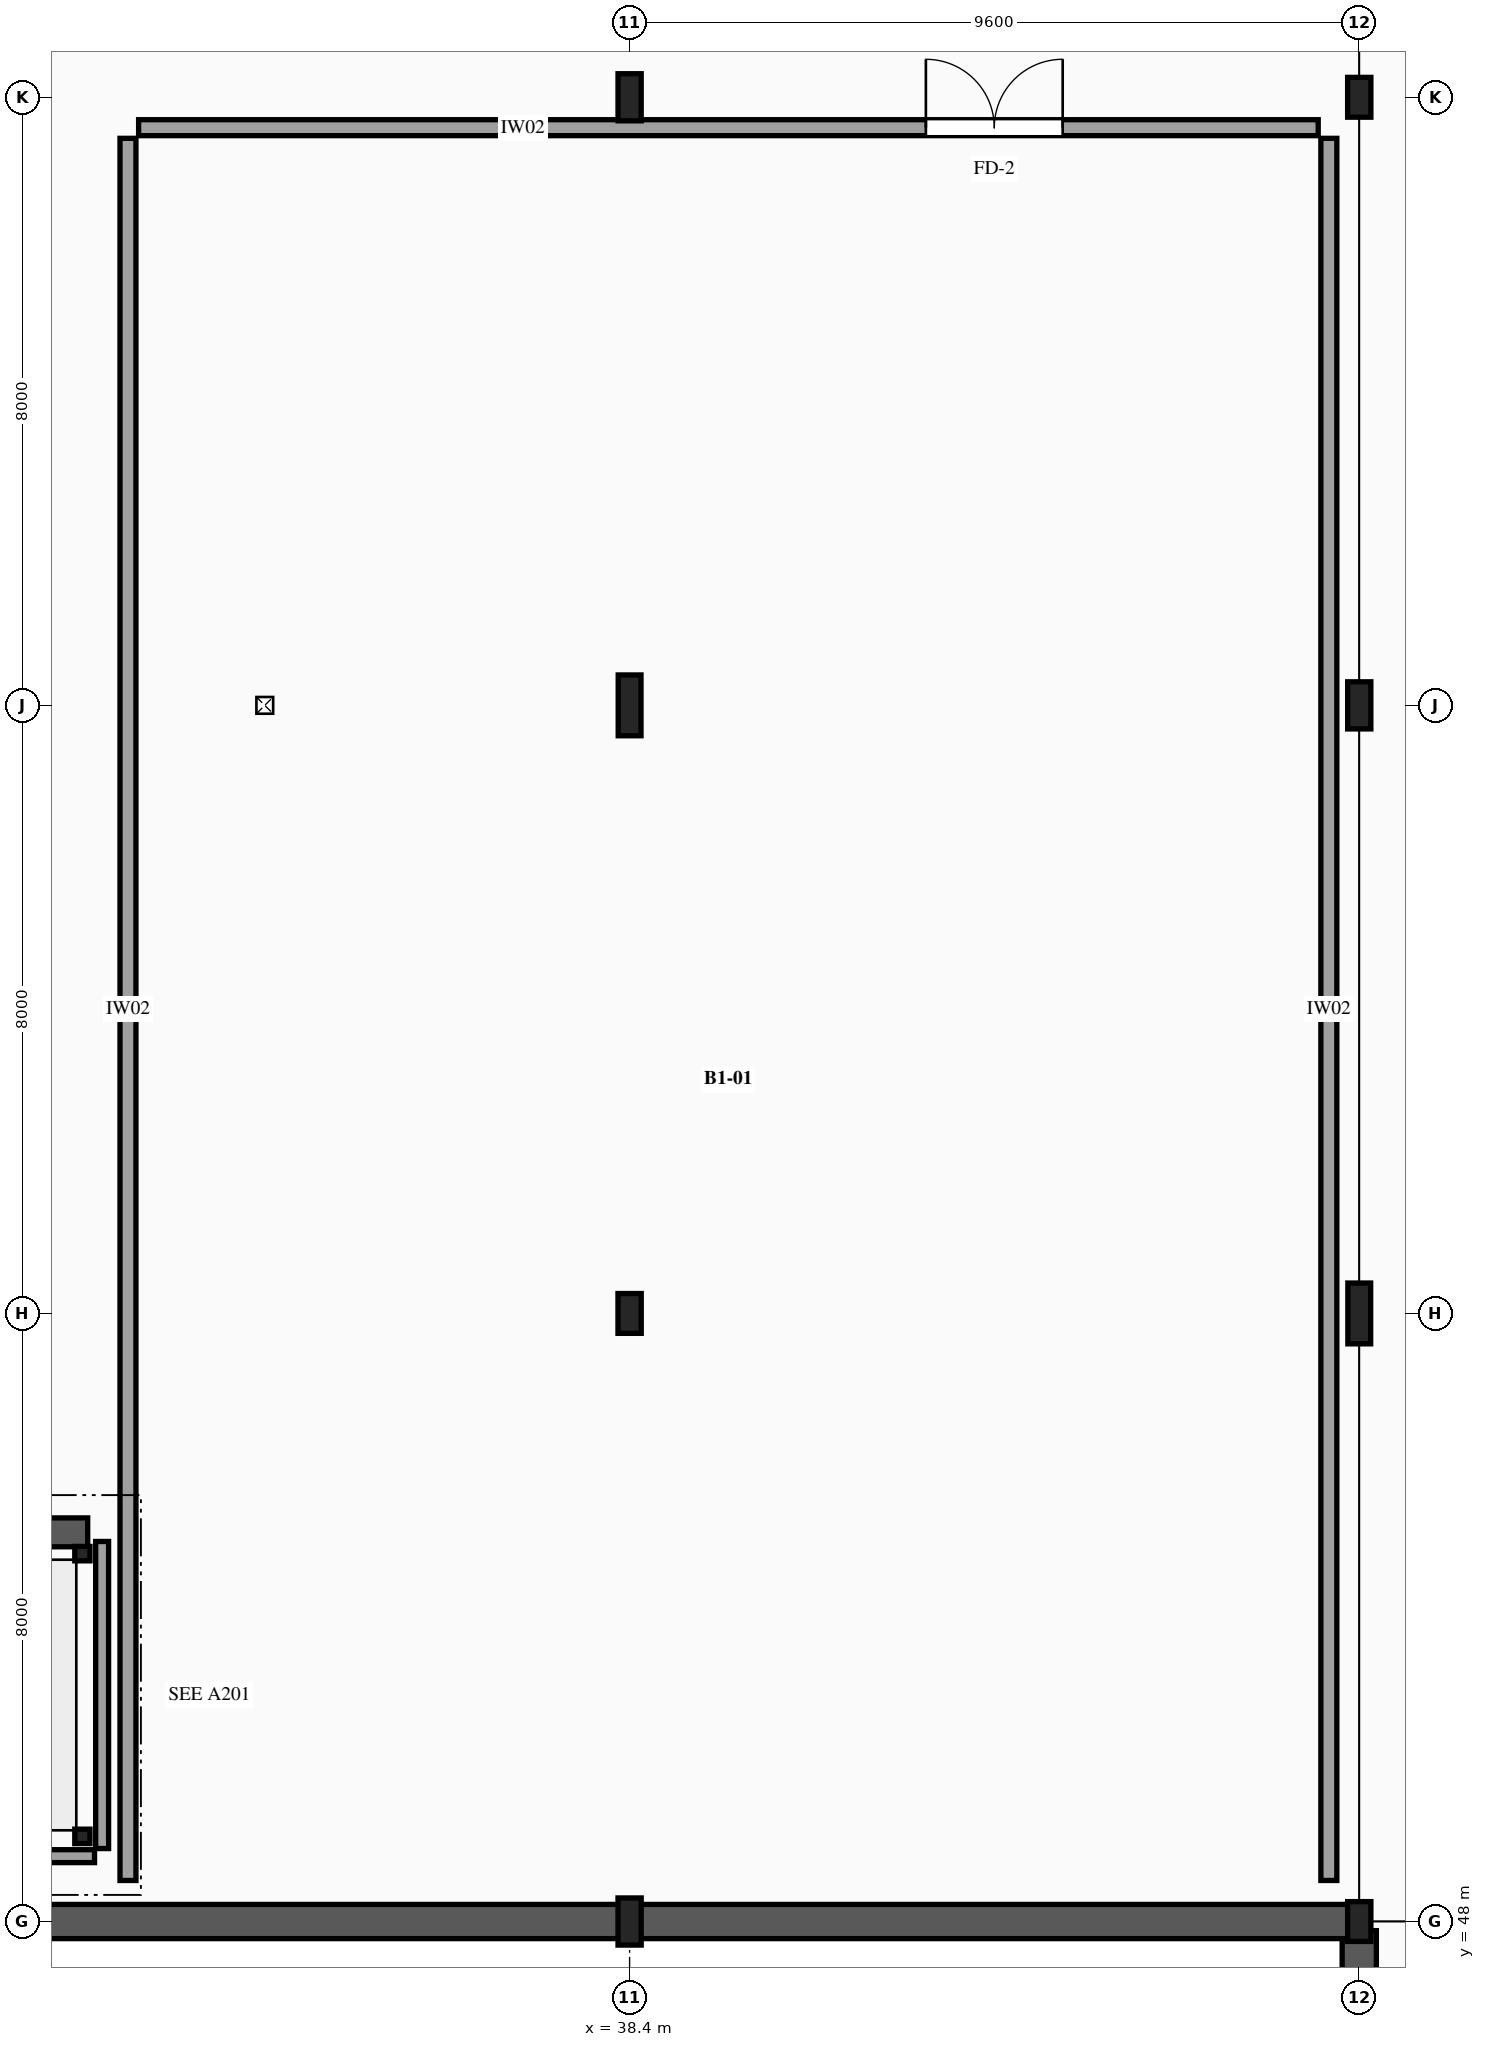
"""IFC4 building model, lengths in metres.
Left out: names, types, materials, properties, quantities, classifications, styles, units other than length and angle.
Written with IfcOpenShell. Run it as: python <this file> out.ifc"""

import sys

from ifc_helpers import new_model, si_unit, direction, frame, frame_2d, origin, origin_2d, place, context, subcontext, project, spatial, rectangle, i_section, extrude, element, fill, save


model = new_model("IFC4")
c1 = context("Model", 3, precision=1e-05, world=origin(), true_north=direction((0.0, 1.0)))
c2 = subcontext(c1, "Body", "Model", "MODEL_VIEW")
j1 = project(units=[si_unit("LENGTHUNIT", "METRE"), si_unit("PLANEANGLEUNIT", "RADIAN")], contexts=[c1])
p1 = place(None, origin())
s1 = spatial("IfcSite", under=j1, at=p1, CompositionType="ELEMENT")
p2 = place(p1, origin())
s2 = spatial("IfcBuilding", under=s1, at=p2, CompositionType="ELEMENT")
p3 = place(p2, frame((0.0, 0.0, -4.5)))
s3 = spatial("IfcBuildingStorey", under=s2, at=p3, CompositionType="ELEMENT", Elevation=-4.5)
p4 = place(p3, frame((38.4, 48.0, 0.0), z_axis=(0.0, 0.0, 1.0), x_axis=(1.0, 0.0, 0.0)))
e1 = element("IfcColumn", 1, at=p4, inside=s3, PredefinedType="COLUMN", context=c2, shape_type="SweptSolid", body=[
    extrude(i_section(OverallWidth=0.305, OverallDepth=0.62, WebThickness=0.021, FlangeThickness=0.04, FilletRadius=0.027, at=origin_2d()), origin(), (0.0, 0.0, 1.0), 4.22),
])
p5 = place(p3, frame((38.4, 56.0, 0.0), z_axis=(0.0, 0.0, 1.0), x_axis=(1.0, 0.0, 0.0)))
e2 = element("IfcColumn", 2, at=p5, inside=s3, PredefinedType="COLUMN", context=c2, shape_type="SweptSolid", body=[
    extrude(i_section(OverallWidth=0.306, OverallDepth=0.524, WebThickness=0.021, FlangeThickness=0.04, FilletRadius=0.027, at=origin_2d()), origin(), (0.0, 0.0, 1.0), 4.22),
])
p6 = place(p3, frame((38.4, 64.0, 0.0), z_axis=(0.0, 0.0, 1.0), x_axis=(1.0, 0.0, 0.0)))
e3 = element("IfcColumn", 3, at=p6, inside=s3, PredefinedType="COLUMN", context=c2, shape_type="SweptSolid", body=[
    extrude(i_section(OverallWidth=0.3, OverallDepth=0.8, WebThickness=0.018, FlangeThickness=0.033, FilletRadius=0.03, at=origin_2d()), origin(), (0.0, 0.0, 1.0), 4.22),
])
p7 = place(p3, frame((38.4, 72.0, 0.0), z_axis=(0.0, 0.0, 1.0), x_axis=(1.0, 0.0, 0.0)))
e4 = element("IfcColumn", 4, at=p7, inside=s3, PredefinedType="COLUMN", context=c2, shape_type="SweptSolid", body=[
    extrude(i_section(OverallWidth=0.305, OverallDepth=0.62, WebThickness=0.021, FlangeThickness=0.04, FilletRadius=0.027, at=origin_2d()), origin(), (0.0, 0.0, 1.0), 4.22),
])
p8 = place(p3, frame((48.0, 48.0, 0.0), z_axis=(0.0, 0.0, 1.0), x_axis=(1.0, 0.0, 0.0)))
e5 = element("IfcColumn", 5, at=p8, inside=s3, PredefinedType="COLUMN", context=c2, shape_type="SweptSolid", body=[
    extrude(i_section(OverallWidth=0.306, OverallDepth=0.524, WebThickness=0.021, FlangeThickness=0.04, FilletRadius=0.027, at=origin_2d()), origin(), (0.0, 0.0, 1.0), 4.22),
])
p9 = place(p3, frame((48.0, 56.0, 0.0), z_axis=(0.0, 0.0, 1.0), x_axis=(1.0, 0.0, 0.0)))
e6 = element("IfcColumn", 6, at=p9, inside=s3, PredefinedType="COLUMN", context=c2, shape_type="SweptSolid", body=[
    extrude(i_section(OverallWidth=0.3, OverallDepth=0.8, WebThickness=0.018, FlangeThickness=0.033, FilletRadius=0.03, at=origin_2d()), origin(), (0.0, 0.0, 1.0), 4.22),
])
p10 = place(p3, frame((48.0, 64.0, 0.0), z_axis=(0.0, 0.0, 1.0), x_axis=(1.0, 0.0, 0.0)))
e7 = element("IfcColumn", 7, at=p10, inside=s3, PredefinedType="COLUMN", context=c2, shape_type="SweptSolid", body=[
    extrude(i_section(OverallWidth=0.305, OverallDepth=0.62, WebThickness=0.021, FlangeThickness=0.04, FilletRadius=0.027, at=origin_2d()), origin(), (0.0, 0.0, 1.0), 4.22),
])
p11 = place(p3, frame((48.0, 72.0, 0.0), z_axis=(0.0, 0.0, 1.0), x_axis=(1.0, 0.0, 0.0)))
e8 = element("IfcColumn", 8, at=p11, inside=s3, PredefinedType="COLUMN", context=c2, shape_type="SweptSolid", body=[
    extrude(i_section(OverallWidth=0.306, OverallDepth=0.524, WebThickness=0.021, FlangeThickness=0.04, FilletRadius=0.027, at=origin_2d()), origin(), (0.0, 0.0, 1.0), 4.22),
])
p12 = place(p3, frame((48.0, 40.12, 0.0), z_axis=(0.0, 0.0, 1.0), x_axis=(0.0, 1.0, 0.0)))
e9 = element("IfcWall", 9, at=p12, inside=s3, PredefinedType="SHEAR", context=c2, shape_type="SweptSolid", body=[
    extrude(rectangle(XDim=7.76, YDim=0.45, at=frame_2d((3.88, 0.0))), origin(), (0.0, 0.0, 1.0), 4.22),
])
p13 = place(p3, frame((28.92, 48.0, 0.0), z_axis=(0.0, 0.0, 1.0), x_axis=(1.0, 0.0, 0.0)))
e10 = element("IfcWall", 10, at=p13, inside=s3, PredefinedType="SHEAR", context=c2, shape_type="SweptSolid", body=[
    extrude(rectangle(XDim=9.36, YDim=0.45, at=frame_2d((4.68, 0.0))), origin(), (0.0, 0.0, 1.0), 4.22),
])
p14 = place(p3, frame((38.52, 48.0, 0.0), z_axis=(0.0, 0.0, 1.0), x_axis=(1.0, 0.0, 0.0)))
e11 = element("IfcWall", 11, at=p14, inside=s3, PredefinedType="SHEAR", context=c2, shape_type="SweptSolid", body=[
    extrude(rectangle(XDim=9.36, YDim=0.45, at=frame_2d((4.68, 0.0))), origin(), (0.0, 0.0, 1.0), 4.22),
])
p15 = place(p3, frame((21.45, 53.12, 0.0), z_axis=(0.0, 0.0, 1.0), x_axis=(1.0, 0.0, 0.0)))
e12 = element("IfcWall", 12, at=p15, inside=s3, PredefinedType="SHEAR", context=c2, shape_type="SweptSolid", body=[
    extrude(rectangle(XDim=9.82, YDim=0.38, at=frame_2d((4.91, 0.0))), origin(), (0.0, 0.0, 1.0), 4.22),
])
for number, where, z_axis, x_axis in (
    (13, (31.2, 49.12, 0.0), (0.0, 0.0, 1.0), (1.0, 0.0, 0.0)),
    (14, (31.2, 52.84, 0.0), (0.0, 0.0, 1.0), (1.0, 0.0, 0.0)),
):
    element("IfcColumn", number, at=place(p3, frame(where, z_axis=z_axis, x_axis=x_axis)), inside=s3, PredefinedType="COLUMN", context=c2, shape_type="SweptSolid", body=[
        extrude(i_section(OverallWidth=0.2, OverallDepth=0.19, WebThickness=0.007, FlangeThickness=0.01, FilletRadius=0.018, at=origin_2d()), origin(), (0.0, 0.0, 1.0), 4.5),
    ])
p16 = place(p3, frame((31.46, 48.96, 0.0), z_axis=(0.0, 0.0, 1.0), x_axis=(0.0, 1.0, 0.0)))
e15 = element("IfcWall", 15, at=p16, inside=s3, PredefinedType="SOLIDWALL", context=c2, shape_type="SweptSolid", body=[
    extrude(rectangle(XDim=4.04, YDim=0.17, at=frame_2d((2.02, 0.0))), origin(), (0.0, 0.0, 1.0), 3.58),
])
p17 = place(p3, frame((21.36, 48.86, 0.0), z_axis=(0.0, 0.0, 1.0), x_axis=(1.0, 0.0, 0.0)))
e16 = element("IfcWall", 16, at=p17, inside=s3, PredefinedType="SOLIDWALL", context=c2, shape_type="SweptSolid", body=[
    extrude(rectangle(XDim=10.0, YDim=0.17, at=frame_2d((5.0, 0.0))), origin(), (0.0, 0.0, 1.0), 3.58),
])
p18 = place(p3, frame((31.94, 71.6, 0.0), z_axis=(0.0, 0.0, 1.0), x_axis=(1.0, 0.0, 0.0)))
e17 = element("IfcWall", 17, at=p18, inside=s3, PredefinedType="SOLIDWALL", context=c2, shape_type="SweptSolid", body=[
    extrude(rectangle(XDim=15.52, YDim=0.21, at=frame_2d((7.76, 0.0))), origin(), (0.0, 0.0, 1.0), 3.58),
])
p19 = place(p18, frame((10.358, 0.0, 0.0)))
e18 = element("IfcOpeningElement", 18, at=p19, cuts=e17, PredefinedType="OPENING", context=c2, shape_type="SweptSolid", body=[
    extrude(rectangle(XDim=1.8, YDim=2.4, at=frame_2d((0.9, 1.2))), frame((0.0, 0.115, 0.0), z_axis=(0.0, -1.0, 0.0), x_axis=(1.0, 0.0, 0.0)), (0.0, 0.0, 1.0), 0.23),
])
for number, where, z_axis, x_axis in (
    (19, (31.8, 48.54, 0.0), (0.0, 0.0, 1.0), (0.0, 1.0, 0.0)),
    (20, (47.6, 48.54, 0.0), (0.0, 0.0, 1.0), (0.0, 1.0, 0.0)),
):
    element("IfcWall", number, at=place(p3, frame(where, z_axis=z_axis, x_axis=x_axis)), inside=s3, PredefinedType="SOLIDWALL", context=c2, shape_type="SweptSolid", body=[
        extrude(rectangle(XDim=22.92, YDim=0.21, at=frame_2d((11.46, 0.0))), origin(), (0.0, 0.0, 1.0), 3.58),
    ])
p20 = place(p19, origin())
e21 = element("IfcDoor", 21, at=p20, inside=s3, OperationType="DOUBLE_DOOR_SINGLE_SWING", PredefinedType="DOOR", context=c2, shape_type="SweptSolid", body=[
    extrude(rectangle(XDim=1.8, YDim=2.4, at=frame_2d((0.9, 1.2))), frame((0.0, 0.025, 0.0), z_axis=(0.0, -1.0, 0.0), x_axis=(1.0, 0.0, 0.0)), (0.0, 0.0, 1.0), 0.05),
])
fill(e18, e21)
save(model, sys.argv[1])
